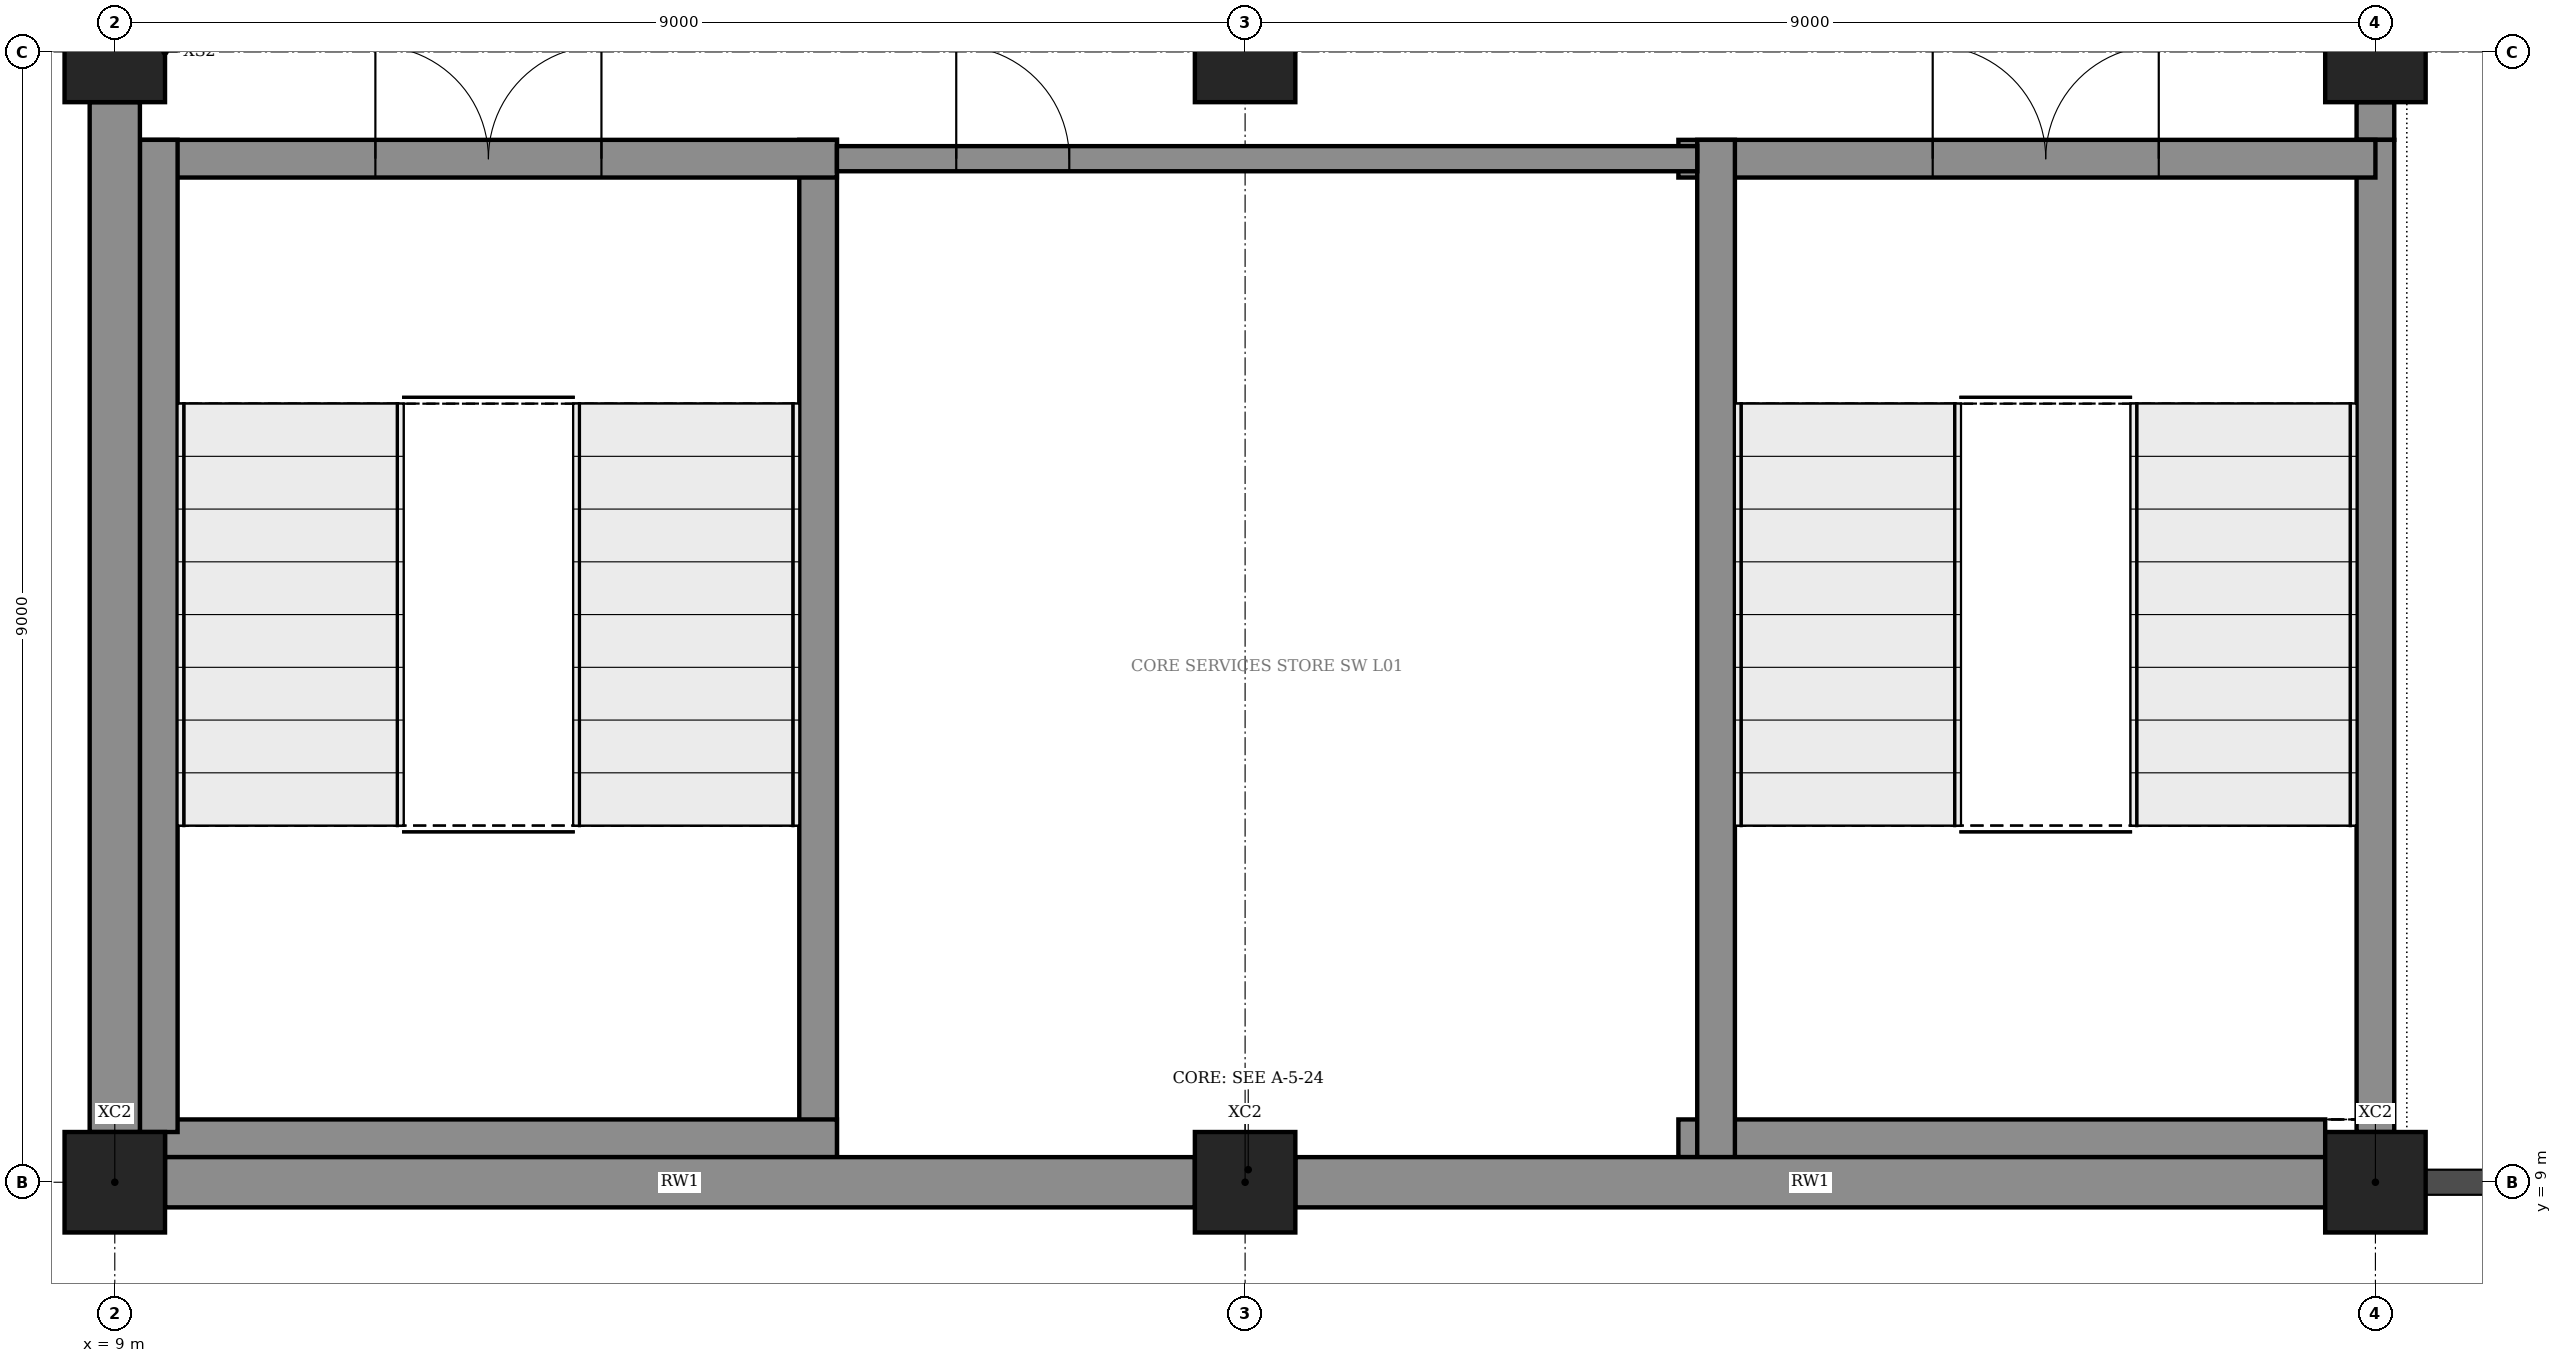
"""IFC4 building model, lengths in metres.
Left out: names, types, materials, properties, quantities, classifications, styles, units other than length and angle.
Written with IfcOpenShell. Run it as: python <this file> out.ifc"""

import sys

from ifc_helpers import new_model, si_unit, direction, frame, frame_2d, origin, origin_2d, place, context, subcontext, project, spatial, rectangle, extrude, element, fill, save


model = new_model("IFC4")
c1 = context("Model", 3, precision=1e-05, world=origin(), true_north=direction((0.0, 1.0)))
c2 = subcontext(c1, "Body", "Model", "MODEL_VIEW")
j1 = project(units=[si_unit("LENGTHUNIT", "METRE"), si_unit("PLANEANGLEUNIT", "RADIAN")], contexts=[c1])
p1 = place(None, origin())
s1 = spatial("IfcSite", under=j1, at=p1, CompositionType="ELEMENT")
p2 = place(p1, origin())
s2 = spatial("IfcBuilding", under=s1, at=p2, CompositionType="ELEMENT")
p3 = place(p2, frame((0.0, 0.0, 6.0)))
s3 = spatial("IfcBuildingStorey", under=s2, at=p3, CompositionType="ELEMENT", Elevation=6.0)
for number, where, z_axis, x_axis in (
    (1, (9.0, 9.0, 0.0), (0.0, 0.0, 1.0), (1.0, 0.0, 0.0)),
    (2, (9.0, 18.0, 0.0), (0.0, 0.0, 1.0), (1.0, 0.0, 0.0)),
    (3, (18.0, 9.0, 0.0), (0.0, 0.0, 1.0), (1.0, 0.0, 0.0)),
    (4, (18.0, 18.0, 0.0), (0.0, 0.0, 1.0), (1.0, 0.0, 0.0)),
    (5, (27.0, 9.0, 0.0), (0.0, 0.0, 1.0), (1.0, 0.0, 0.0)),
    (6, (27.0, 18.0, 0.0), (0.0, 0.0, 1.0), (1.0, 0.0, 0.0)),
):
    element("IfcColumn", number, at=place(p3, frame(where, z_axis=z_axis, x_axis=x_axis)), inside=s3, PredefinedType="COLUMN", context=c2, shape_type="SweptSolid", body=[
        extrude(rectangle(XDim=0.8, YDim=0.8, at=origin_2d()), origin(), (0.0, 0.0, 1.0), 5.5),
    ])
for number, where, z_axis, x_axis in (
    (7, (9.4, 9.0, 0.0), (0.0, 0.0, 1.0), (1.0, 0.0, 0.0)),
    (8, (18.4, 9.0, 0.0), (0.0, 0.0, 1.0), (1.0, 0.0, 0.0)),
    (9, (9.0, 9.4, 0.0), (0.0, 0.0, 1.0), (0.0, 1.0, 0.0)),
):
    element("IfcWall", number, at=place(p3, frame(where, z_axis=z_axis, x_axis=x_axis)), inside=s3, PredefinedType="SOLIDWALL", context=c2, shape_type="SweptSolid", body=[
        extrude(rectangle(XDim=8.2, YDim=0.4, at=frame_2d((4.1, 0.0))), origin(), (0.0, 0.0, 1.0), 4.32),
    ])
p4 = place(p3, frame((9.4, 9.35, 0.0), z_axis=(0.0, 0.0, 1.0), x_axis=(1.0, 0.0, 0.0)))
e10 = element("IfcWall", 10, at=p4, inside=s3, PredefinedType="SOLIDWALL", context=c2, shape_type="SweptSolid", body=[
    extrude(rectangle(XDim=5.35, YDim=0.3, at=frame_2d((2.675, 0.0))), origin(), (0.0, 0.0, 1.0), 5.22),
])
p5 = place(p3, frame((9.2, 17.15, 0.0), z_axis=(0.0, 0.0, 1.0), x_axis=(1.0, 0.0, 0.0)))
e11 = element("IfcWall", 11, at=p5, inside=s3, PredefinedType="SOLIDWALL", context=c2, shape_type="SweptSolid", body=[
    extrude(rectangle(XDim=5.55, YDim=0.3, at=frame_2d((2.775, 0.0))), origin(), (0.0, 0.0, 1.0), 5.22),
])
p6 = place(p5, frame((1.875, 0.0, 0.0)))
e12 = element("IfcOpeningElement", 12, at=p6, cuts=e11, PredefinedType="OPENING", context=c2, shape_type="SweptSolid", body=[
    extrude(rectangle(XDim=1.8, YDim=2.4, at=frame_2d((0.9, 1.2))), frame((0.0, 0.16, 0.0), z_axis=(0.0, -1.0, 0.0), x_axis=(1.0, 0.0, 0.0)), (0.0, 0.0, 1.0), 0.32),
])
p7 = place(p3, frame((9.35, 9.4, 0.0), z_axis=(0.0, 0.0, 1.0), x_axis=(0.0, 1.0, 0.0)))
e13 = element("IfcWall", 13, at=p7, inside=s3, PredefinedType="SOLIDWALL", context=c2, shape_type="SweptSolid", body=[
    extrude(rectangle(XDim=7.9, YDim=0.3, at=frame_2d((3.95, 0.0))), origin(), (0.0, 0.0, 1.0), 5.22),
])
p8 = place(p3, frame((14.6, 9.2, 0.0), z_axis=(0.0, 0.0, 1.0), x_axis=(0.0, 1.0, 0.0)))
e14 = element("IfcWall", 14, at=p8, inside=s3, PredefinedType="SOLIDWALL", context=c2, shape_type="SweptSolid", body=[
    extrude(rectangle(XDim=8.1, YDim=0.3, at=frame_2d((4.05, 0.0))), origin(), (0.0, 0.0, 1.0), 5.22),
])
p9 = place(p3, frame((21.45, 9.35, 0.0), z_axis=(0.0, 0.0, 1.0), x_axis=(1.0, 0.0, 0.0)))
e15 = element("IfcWall", 15, at=p9, inside=s3, PredefinedType="SOLIDWALL", context=c2, shape_type="SweptSolid", body=[
    extrude(rectangle(XDim=5.15, YDim=0.3, at=frame_2d((2.575, 0.0))), origin(), (0.0, 0.0, 1.0), 5.22),
])
p10 = place(p3, frame((21.45, 17.15, 0.0), z_axis=(0.0, 0.0, 1.0), x_axis=(1.0, 0.0, 0.0)))
e16 = element("IfcWall", 16, at=p10, inside=s3, PredefinedType="SOLIDWALL", context=c2, shape_type="SweptSolid", body=[
    extrude(rectangle(XDim=5.55, YDim=0.3, at=frame_2d((2.775, 0.0))), origin(), (0.0, 0.0, 1.0), 5.22),
])
p11 = place(p10, frame((2.025, 0.0, 0.0)))
e17 = element("IfcOpeningElement", 17, at=p11, cuts=e16, PredefinedType="OPENING", context=c2, shape_type="SweptSolid", body=[
    extrude(rectangle(XDim=1.8, YDim=2.4, at=frame_2d((0.9, 1.2))), frame((0.0, 0.16, 0.0), z_axis=(0.0, -1.0, 0.0), x_axis=(1.0, 0.0, 0.0)), (0.0, 0.0, 1.0), 0.32),
])
p12 = place(p3, frame((21.75, 9.2, 0.0), z_axis=(0.0, 0.0, 1.0), x_axis=(0.0, 1.0, 0.0)))
e18 = element("IfcWall", 18, at=p12, inside=s3, PredefinedType="SOLIDWALL", context=c2, shape_type="SweptSolid", body=[
    extrude(rectangle(XDim=8.1, YDim=0.3, at=frame_2d((4.05, 0.0))), origin(), (0.0, 0.0, 1.0), 5.22),
])
p13 = place(p3, frame((27.0, 9.4, 0.0), z_axis=(0.0, 0.0, 1.0), x_axis=(0.0, 1.0, 0.0)))
e19 = element("IfcWall", 19, at=p13, inside=s3, PredefinedType="SOLIDWALL", context=c2, shape_type="SweptSolid", body=[
    extrude(rectangle(XDim=7.9, YDim=0.3, at=frame_2d((3.95, 0.0))), origin(), (0.0, 0.0, 1.0), 5.22),
])
p14 = place(p3, frame((14.75, 17.15, 0.0), z_axis=(0.0, 0.0, 1.0), x_axis=(1.0, 0.0, 0.0)))
e20 = element("IfcWall", 20, at=p14, inside=s3, PredefinedType="PARTITIONING", context=c2, shape_type="SweptSolid", body=[
    extrude(rectangle(XDim=6.85, YDim=0.2, at=frame_2d((3.425, 0.0))), origin(), (0.0, 0.0, 1.0), 5.22),
])
p15 = place(p14, frame((0.95, 0.0, 0.0)))
e21 = element("IfcOpeningElement", 21, at=p15, cuts=e20, PredefinedType="OPENING", context=c2, shape_type="SweptSolid", body=[
    extrude(rectangle(XDim=0.9, YDim=2.1, at=frame_2d((0.45, 1.05))), frame((0.0, 0.11, 0.0), z_axis=(0.0, -1.0, 0.0), x_axis=(1.0, 0.0, 0.0)), (0.0, 0.0, 1.0), 0.22),
])
p16 = place(p3, frame((27.0, 17.3, 0.0), z_axis=(0.0, 0.0, 1.0), x_axis=(0.0, 1.0, 0.0)))
e22 = element("IfcWall", 22, at=p16, inside=s3, PredefinedType="SOLIDWALL", context=c2, shape_type="SweptSolid", body=[
    extrude(rectangle(XDim=0.3, YDim=0.3, at=frame_2d((0.15, 0.0))), origin(), (0.0, 0.0, 1.0), 4.32),
])
p17 = place(p6, origin())
e23 = element("IfcDoor", 23, at=p17, inside=s3, OperationType="DOUBLE_DOOR_SINGLE_SWING", PredefinedType="DOOR", context=c2, shape_type="SweptSolid", body=[
    extrude(rectangle(XDim=1.8, YDim=2.4, at=frame_2d((0.9, 1.2))), frame((0.0, 0.025, 0.0), z_axis=(0.0, -1.0, 0.0), x_axis=(1.0, 0.0, 0.0)), (0.0, 0.0, 1.0), 0.05),
])
fill(e12, e23)
p18 = place(p11, origin())
e24 = element("IfcDoor", 24, at=p18, inside=s3, OperationType="DOUBLE_DOOR_SINGLE_SWING", PredefinedType="DOOR", context=c2, shape_type="SweptSolid", body=[
    extrude(rectangle(XDim=1.8, YDim=2.4, at=frame_2d((0.9, 1.2))), frame((0.0, 0.025, 0.0), z_axis=(0.0, -1.0, 0.0), x_axis=(1.0, 0.0, 0.0)), (0.0, 0.0, 1.0), 0.05),
])
fill(e17, e24)
p19 = place(p15, origin())
e25 = element("IfcDoor", 25, at=p19, inside=s3, OperationType="SINGLE_SWING_LEFT", PredefinedType="DOOR", context=c2, shape_type="SweptSolid", body=[
    extrude(rectangle(XDim=0.9, YDim=2.1, at=frame_2d((0.45, 1.05))), frame((0.0, 0.025, 0.0), z_axis=(0.0, -1.0, 0.0), x_axis=(1.0, 0.0, 0.0)), (0.0, 0.0, 1.0), 0.05),
])
fill(e21, e25)
save(model, sys.argv[1])
